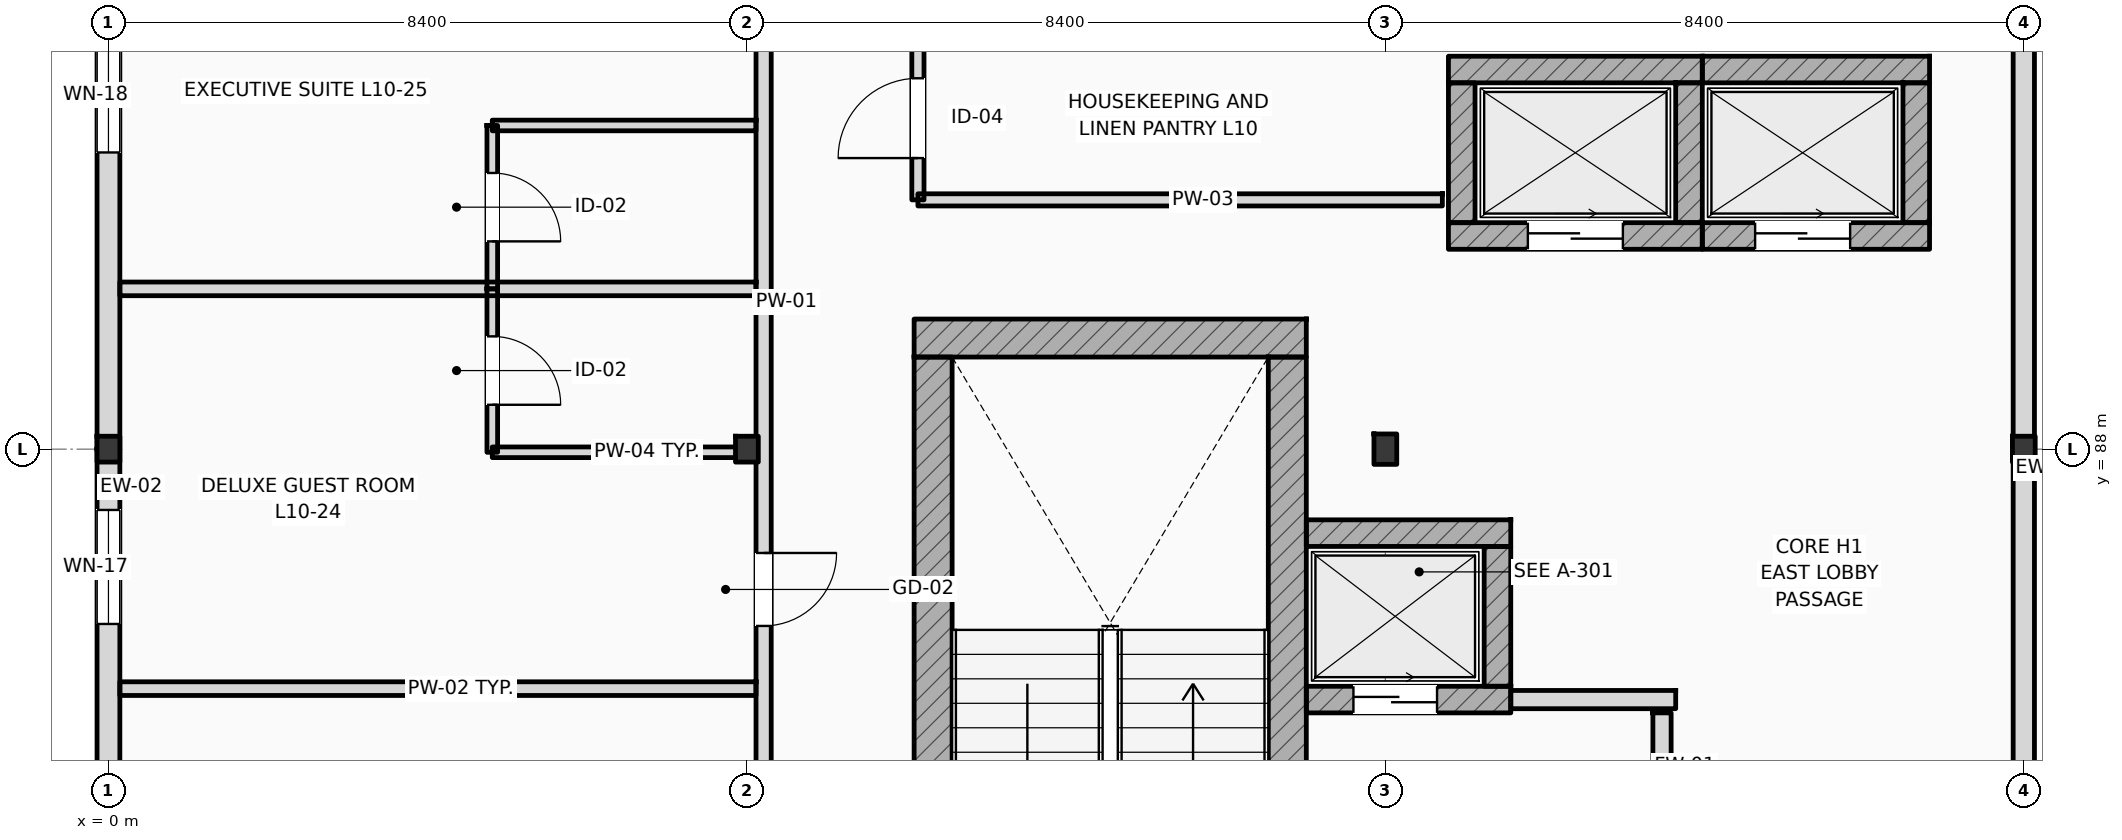
"""IFC4 building model, lengths in metres.
Left out: names, types, materials, properties, quantities, classifications, styles, units other than length and angle.
Written with IfcOpenShell. Run it as: python <this file> out.ifc"""

import sys

from ifc_helpers import new_model, si_unit, direction, frame, frame_2d, origin, origin_2d, place, context, subcontext, project, spatial, rectangle, i_section, extrude, element, fill, save


model = new_model("IFC4")
c1 = context("Model", 3, precision=1e-05, world=origin(), true_north=direction((0.0, 1.0)))
c2 = subcontext(c1, "Body", "Model", "MODEL_VIEW")
j1 = project(units=[si_unit("LENGTHUNIT", "METRE"), si_unit("PLANEANGLEUNIT", "RADIAN")], contexts=[c1])
p1 = place(None, origin())
s1 = spatial("IfcSite", under=j1, at=p1, CompositionType="ELEMENT")
p2 = place(p1, origin())
s2 = spatial("IfcBuilding", under=s1, at=p2, CompositionType="ELEMENT")
p3 = place(p2, frame((0.0, 0.0, 42.6)))
s3 = spatial("IfcBuildingStorey", under=s2, at=p3, CompositionType="ELEMENT", Elevation=42.6)
for number, where, z_axis, x_axis in (
    (1, (0.0, 88.0, 0.0), (0.0, 0.0, 1.0), (1.0, 0.0, 0.0)),
    (2, (8.4, 88.0, 0.0), (0.0, 0.0, 1.0), (1.0, 0.0, 0.0)),
):
    element("IfcColumn", number, at=place(p3, frame(where, z_axis=z_axis, x_axis=x_axis)), inside=s3, PredefinedType="COLUMN", context=c2, shape_type="SweptSolid", body=[
        extrude(i_section(OverallWidth=0.3, OverallDepth=0.34, WebThickness=0.012, FlangeThickness=0.021, FilletRadius=0.027, at=origin_2d()), origin(), (0.0, 0.0, 1.0), 4.2),
    ])
p4 = place(p3, frame((16.8, 88.0, 0.0), z_axis=(0.0, 0.0, 1.0), x_axis=(1.0, 0.0, 0.0)))
e3 = element("IfcColumn", 3, at=p4, inside=s3, PredefinedType="COLUMN", context=c2, shape_type="SweptSolid", body=[
    extrude(i_section(OverallWidth=0.3, OverallDepth=0.4, WebThickness=0.013, FlangeThickness=0.024, FilletRadius=0.027, at=origin_2d()), origin(), (0.0, 0.0, 1.0), 4.2),
])
p5 = place(p3, frame((25.2, 88.0, 0.0), z_axis=(0.0, 0.0, 1.0), x_axis=(1.0, 0.0, 0.0)))
e4 = element("IfcColumn", 4, at=p5, inside=s3, PredefinedType="COLUMN", context=c2, shape_type="SweptSolid", body=[
    extrude(i_section(OverallWidth=0.3, OverallDepth=0.34, WebThickness=0.012, FlangeThickness=0.021, FilletRadius=0.027, at=origin_2d()), origin(), (0.0, 0.0, 1.0), 4.2),
])
p6 = place(p3, frame((10.6, 89.462, 0.0), z_axis=(0.0, 0.0, 1.0), x_axis=(1.0, 0.0, 0.0)))
e5 = element("IfcWall", 5, at=p6, inside=s3, PredefinedType="SHEAR", context=c2, shape_type="SweptSolid", body=[
    extrude(rectangle(XDim=5.16, YDim=0.5, at=frame_2d((2.58, 0.0))), origin(), (0.0, 0.0, 1.0), 4.2),
])
p7 = place(p3, frame((10.85, 80.1, 0.0), z_axis=(0.0, 0.0, 1.0), x_axis=(0.0, 1.0, 0.0)))
e6 = element("IfcWall", 6, at=p7, inside=s3, PredefinedType="SHEAR", context=c2, shape_type="SweptSolid", body=[
    extrude(rectangle(XDim=9.112, YDim=0.5, at=frame_2d((4.556, 0.0))), origin(), (0.0, 0.0, 1.0), 4.2),
])
p8 = place(p3, frame((15.51, 80.1, 0.0), z_axis=(0.0, 0.0, 1.0), x_axis=(0.0, 1.0, 0.0)))
e7 = element("IfcWall", 7, at=p8, inside=s3, PredefinedType="SHEAR", context=c2, shape_type="SweptSolid", body=[
    extrude(rectangle(XDim=9.112, YDim=0.5, at=frame_2d((4.556, 0.0))), origin(), (0.0, 0.0, 1.0), 4.2),
])
p9 = place(p8, frame((0.44, 0.0, 0.0)))
e8 = element("IfcOpeningElement", 8, at=p9, cuts=e7, PredefinedType="OPENING", context=c2, shape_type="SweptSolid", body=[
    extrude(rectangle(XDim=1.1, YDim=2.2, at=frame_2d((0.55, 1.1))), frame((0.0, 0.26, 0.0), z_axis=(0.0, -1.0, 0.0), x_axis=(1.0, 0.0, 0.0)), (0.0, 0.0, 1.0), 0.52),
])
p10 = place(p3, frame((0.0, 79.5, 0.0), z_axis=(0.0, 0.0, 1.0), x_axis=(0.0, 1.0, 0.0)))
e9 = element("IfcWall", 9, at=p10, inside=s3, PredefinedType="STANDARD", context=c2, shape_type="SweptSolid", body=[
    extrude(rectangle(XDim=8.5, YDim=0.3, at=frame_2d((4.25, 0.0))), origin(), (0.0, 0.0, 1.0), 3.57),
])
p11 = place(p10, frame((2.075, 0.0, 0.9)))
e10 = element("IfcOpeningElement", 10, at=p11, cuts=e9, PredefinedType="OPENING", context=c2, shape_type="SweptSolid", body=[
    extrude(rectangle(XDim=1.5, YDim=2.49, at=frame_2d((0.75, 1.245))), frame((0.0, 0.16, 0.0), z_axis=(0.0, -1.0, 0.0), x_axis=(1.0, 0.0, 0.0)), (0.0, 0.0, 1.0), 0.32),
])
p12 = place(p10, frame((6.2, 0.0, 0.9)))
e11 = element("IfcOpeningElement", 11, at=p12, cuts=e9, PredefinedType="OPENING", context=c2, shape_type="SweptSolid", body=[
    extrude(rectangle(XDim=1.5, YDim=2.49, at=frame_2d((0.75, 1.245))), frame((0.0, 0.16, 0.0), z_axis=(0.0, -1.0, 0.0), x_axis=(1.0, 0.0, 0.0)), (0.0, 0.0, 1.0), 0.32),
])
p13 = place(p3, frame((0.0, 88.0, 0.0), z_axis=(0.0, 0.0, 1.0), x_axis=(0.0, 1.0, 0.0)))
e12 = element("IfcWall", 12, at=p13, inside=s3, PredefinedType="STANDARD", context=c2, shape_type="SweptSolid", body=[
    extrude(rectangle(XDim=7.5, YDim=0.3, at=frame_2d((3.75, 0.0))), origin(), (0.0, 0.0, 1.0), 3.94),
])
p14 = place(p13, frame((3.904, 0.0, 0.9)))
e13 = element("IfcOpeningElement", 13, at=p14, cuts=e12, PredefinedType="OPENING", context=c2, shape_type="SweptSolid", body=[
    extrude(rectangle(XDim=1.5, YDim=2.86, at=frame_2d((0.75, 1.43))), frame((0.0, 0.16, 0.0), z_axis=(0.0, -1.0, 0.0), x_axis=(1.0, 0.0, 0.0)), (0.0, 0.0, 1.0), 0.32),
])
p15 = place(p3, frame((25.2, 79.5, 0.0), z_axis=(0.0, 0.0, 1.0), x_axis=(0.0, 1.0, 0.0)))
e14 = element("IfcWall", 14, at=p15, inside=s3, PredefinedType="STANDARD", context=c2, shape_type="SweptSolid", body=[
    extrude(rectangle(XDim=16.5, YDim=0.28, at=frame_2d((8.25, 0.0))), origin(), (0.0, 0.0, 1.0), 3.57),
])
p16 = place(p3, frame((15.76, 86.895, 0.0), z_axis=(0.0, 0.0, 1.0), x_axis=(1.0, 0.0, 0.0)))
e15 = element("IfcWall", 15, at=p16, inside=s3, PredefinedType="SHEAR", context=c2, shape_type="SweptSolid", body=[
    extrude(rectangle(XDim=2.69, YDim=0.35, at=frame_2d((1.345, 0.0))), origin(), (0.0, 0.0, 1.0), 3.94),
])
p17 = place(p3, frame((15.76, 84.705, 0.0), z_axis=(0.0, 0.0, 1.0), x_axis=(1.0, 0.0, 0.0)))
e16 = element("IfcWall", 16, at=p17, inside=s3, PredefinedType="SHEAR", context=c2, shape_type="SweptSolid", body=[
    extrude(rectangle(XDim=2.69, YDim=0.35, at=frame_2d((1.345, 0.0))), origin(), (0.0, 0.0, 1.0), 3.94),
])
p18 = place(p17, frame((0.62, 0.0, 0.0)))
e17 = element("IfcOpeningElement", 17, at=p18, cuts=e16, PredefinedType="OPENING", context=c2, shape_type="SweptSolid", body=[
    extrude(rectangle(XDim=1.1, YDim=2.2, at=frame_2d((0.55, 1.1))), frame((0.0, 0.185, 0.0), z_axis=(0.0, -1.0, 0.0), x_axis=(1.0, 0.0, 0.0)), (0.0, 0.0, 1.0), 0.37),
])
p19 = place(p3, frame((18.275, 84.88, 0.0), z_axis=(0.0, 0.0, 1.0), x_axis=(0.0, 1.0, 0.0)))
e18 = element("IfcWall", 18, at=p19, inside=s3, PredefinedType="SHEAR", context=c2, shape_type="SweptSolid", body=[
    extrude(rectangle(XDim=1.84, YDim=0.35, at=frame_2d((0.92, 0.0))), origin(), (0.0, 0.0, 1.0), 3.94),
])
p20 = place(p3, frame((17.63, 92.995, 0.0), z_axis=(0.0, 0.0, 1.0), x_axis=(1.0, 0.0, 0.0)))
e19 = element("IfcWall", 19, at=p20, inside=s3, PredefinedType="SHEAR", context=c2, shape_type="SweptSolid", body=[
    extrude(rectangle(XDim=3.34, YDim=0.35, at=frame_2d((1.67, 0.0))), origin(), (0.0, 0.0, 1.0), 3.94),
])
p21 = place(p3, frame((17.63, 90.805, 0.0), z_axis=(0.0, 0.0, 1.0), x_axis=(1.0, 0.0, 0.0)))
e20 = element("IfcWall", 20, at=p21, inside=s3, PredefinedType="SHEAR", context=c2, shape_type="SweptSolid", body=[
    extrude(rectangle(XDim=3.34, YDim=0.35, at=frame_2d((1.67, 0.0))), origin(), (0.0, 0.0, 1.0), 3.94),
])
p22 = place(p21, frame((1.045, 0.0, 0.0)))
e21 = element("IfcOpeningElement", 21, at=p22, cuts=e20, PredefinedType="OPENING", context=c2, shape_type="SweptSolid", body=[
    extrude(rectangle(XDim=1.25, YDim=2.25, at=frame_2d((0.625, 1.125))), frame((0.0, 0.185, 0.0), z_axis=(0.0, -1.0, 0.0), x_axis=(1.0, 0.0, 0.0)), (0.0, 0.0, 1.0), 0.37),
])
for number, where, z_axis, x_axis in (
    (22, (17.805, 90.98, 0.0), (0.0, 0.0, 1.0), (0.0, 1.0, 0.0)),
    (23, (20.795, 90.98, 0.0), (0.0, 0.0, 1.0), (0.0, 1.0, 0.0)),
):
    element("IfcWall", number, at=place(p3, frame(where, z_axis=z_axis, x_axis=x_axis)), inside=s3, PredefinedType="SHEAR", context=c2, shape_type="SweptSolid", body=[
        extrude(rectangle(XDim=1.84, YDim=0.35, at=frame_2d((0.92, 0.0))), origin(), (0.0, 0.0, 1.0), 3.94),
    ])
p23 = place(p3, frame((20.97, 92.995, 0.0), z_axis=(0.0, 0.0, 1.0), x_axis=(1.0, 0.0, 0.0)))
e24 = element("IfcWall", 24, at=p23, inside=s3, PredefinedType="SHEAR", context=c2, shape_type="SweptSolid", body=[
    extrude(rectangle(XDim=2.99, YDim=0.35, at=frame_2d((1.495, 0.0))), origin(), (0.0, 0.0, 1.0), 3.94),
])
p24 = place(p3, frame((20.97, 90.805, 0.0), z_axis=(0.0, 0.0, 1.0), x_axis=(1.0, 0.0, 0.0)))
e25 = element("IfcWall", 25, at=p24, inside=s3, PredefinedType="SHEAR", context=c2, shape_type="SweptSolid", body=[
    extrude(rectangle(XDim=2.99, YDim=0.35, at=frame_2d((1.495, 0.0))), origin(), (0.0, 0.0, 1.0), 3.94),
])
p25 = place(p24, frame((0.695, 0.0, 0.0)))
e26 = element("IfcOpeningElement", 26, at=p25, cuts=e25, PredefinedType="OPENING", context=c2, shape_type="SweptSolid", body=[
    extrude(rectangle(XDim=1.25, YDim=2.25, at=frame_2d((0.625, 1.125))), frame((0.0, 0.185, 0.0), z_axis=(0.0, -1.0, 0.0), x_axis=(1.0, 0.0, 0.0)), (0.0, 0.0, 1.0), 0.37),
])
p26 = place(p3, frame((23.785, 90.98, 0.0), z_axis=(0.0, 0.0, 1.0), x_axis=(0.0, 1.0, 0.0)))
e27 = element("IfcWall", 27, at=p26, inside=s3, PredefinedType="SHEAR", context=c2, shape_type="SweptSolid", body=[
    extrude(rectangle(XDim=1.84, YDim=0.35, at=frame_2d((0.92, 0.0))), origin(), (0.0, 0.0, 1.0), 3.94),
])
p27 = place(p3, frame((18.45, 84.705, 0.0), z_axis=(0.0, 0.0, 1.0), x_axis=(1.0, 0.0, 0.0)))
e28 = element("IfcWall", 28, at=p27, inside=s3, PredefinedType="STANDARD", context=c2, shape_type="SweptSolid", body=[
    extrude(rectangle(XDim=2.17, YDim=0.24, at=frame_2d((1.085, 0.0))), origin(), (0.0, 0.0, 1.0), 3.94),
])
p28 = place(p3, frame((20.44, 80.08, 0.0), z_axis=(0.0, 0.0, 1.0), x_axis=(0.0, 1.0, 0.0)))
e29 = element("IfcWall", 29, at=p28, inside=s3, PredefinedType="STANDARD", context=c2, shape_type="SweptSolid", body=[
    extrude(rectangle(XDim=4.45, YDim=0.24, at=frame_2d((2.225, 0.0))), origin(), (0.0, 0.0, 1.0), 3.94),
])
p29 = place(p28, frame((1.65, 0.0, 0.0)))
e30 = element("IfcOpeningElement", 30, at=p29, cuts=e29, PredefinedType="OPENING", context=c2, shape_type="SweptSolid", body=[
    extrude(rectangle(XDim=1.1, YDim=2.2, at=frame_2d((0.55, 1.1))), frame((0.0, 0.13, 0.0), z_axis=(0.0, -1.0, 0.0), x_axis=(1.0, 0.0, 0.0)), (0.0, 0.0, 1.0), 0.26),
])
p30 = place(p3, frame((8.62, 79.64, 0.0), z_axis=(0.0, 0.0, 1.0), x_axis=(0.0, 1.0, 0.0)))
e31 = element("IfcWall", 31, at=p30, inside=s3, PredefinedType="PARTITIONING", context=c2, shape_type="SweptSolid", body=[
    extrude(rectangle(XDim=15.66, YDim=0.2, at=frame_2d((7.83, 0.0))), origin(), (0.0, 0.0, 1.0), 3.57),
])
p31 = place(p30, frame((3.28, 0.0, 0.0)))
e32 = element("IfcOpeningElement", 32, at=p31, cuts=e31, PredefinedType="OPENING", context=c2, shape_type="SweptSolid", body=[
    extrude(rectangle(XDim=0.96, YDim=2.2, at=frame_2d((0.48, 1.1))), frame((0.0, 0.11, 0.0), z_axis=(0.0, -1.0, 0.0), x_axis=(1.0, 0.0, 0.0)), (0.0, 0.0, 1.0), 0.22),
])
p32 = place(p30, frame((6.034, 0.0, 0.0)))
e33 = element("IfcOpeningElement", 33, at=p32, cuts=e31, PredefinedType="OPENING", context=c2, shape_type="SweptSolid", body=[
    extrude(rectangle(XDim=0.96, YDim=2.2, at=frame_2d((0.48, 1.1))), frame((0.0, 0.11, 0.0), z_axis=(0.0, -1.0, 0.0), x_axis=(1.0, 0.0, 0.0)), (0.0, 0.0, 1.0), 0.22),
])
p33 = place(p30, frame((13.61, 0.0, 0.0)))
e34 = element("IfcOpeningElement", 34, at=p33, cuts=e31, PredefinedType="OPENING", context=c2, shape_type="SweptSolid", body=[
    extrude(rectangle(XDim=0.96, YDim=2.2, at=frame_2d((0.48, 1.1))), frame((0.0, 0.11, 0.0), z_axis=(0.0, -1.0, 0.0), x_axis=(1.0, 0.0, 0.0)), (0.0, 0.0, 1.0), 0.22),
])
p34 = place(p3, frame((10.65, 91.28, 0.0), z_axis=(0.0, 0.0, 1.0), x_axis=(0.0, 1.0, 0.0)))
e35 = element("IfcWall", 35, at=p34, inside=s3, PredefinedType="PARTITIONING", context=c2, shape_type="SweptSolid", body=[
    extrude(rectangle(XDim=4.58, YDim=0.16, at=frame_2d((2.29, 0.0))), origin(), (0.0, 0.0, 1.0), 3.94),
])
p35 = place(p34, frame((0.55, 0.0, 0.0)))
e36 = element("IfcOpeningElement", 36, at=p35, cuts=e35, PredefinedType="OPENING", context=c2, shape_type="SweptSolid", body=[
    extrude(rectangle(XDim=1.05, YDim=2.12, at=frame_2d((0.525, 1.06))), frame((0.0, 0.09, 0.0), z_axis=(0.0, -1.0, 0.0), x_axis=(1.0, 0.0, 0.0)), (0.0, 0.0, 1.0), 0.18),
])
p36 = place(p34, frame((2.75, 0.0, 0.0)))
e37 = element("IfcOpeningElement", 37, at=p36, cuts=e35, PredefinedType="OPENING", context=c2, shape_type="SweptSolid", body=[
    extrude(rectangle(XDim=0.94, YDim=2.15, at=frame_2d((0.47, 1.075))), frame((0.0, 0.09, 0.0), z_axis=(0.0, -1.0, 0.0), x_axis=(1.0, 0.0, 0.0)), (0.0, 0.0, 1.0), 0.18),
])
for number, where, z_axis, x_axis in (
    (38, (0.15, 84.849, 0.0), (0.0, 0.0, 1.0), (1.0, 0.0, 0.0)),
    (39, (0.15, 90.109, 0.0), (0.0, 0.0, 1.0), (1.0, 0.0, 0.0)),
):
    element("IfcWall", number, at=place(p3, frame(where, z_axis=z_axis, x_axis=x_axis)), inside=s3, PredefinedType="PARTITIONING", context=c2, shape_type="SweptSolid", body=[
        extrude(rectangle(XDim=8.37, YDim=0.18, at=frame_2d((4.185, 0.0))), origin(), (0.0, 0.0, 1.0), 3.94),
    ])
p37 = place(p3, frame((5.05, 87.959, 0.0), z_axis=(0.0, 0.0, 1.0), x_axis=(1.0, 0.0, 0.0)))
e40 = element("IfcWall", 40, at=p37, inside=s3, PredefinedType="PARTITIONING", context=c2, shape_type="SweptSolid", body=[
    extrude(rectangle(XDim=3.47, YDim=0.14, at=frame_2d((1.735, 0.0))), origin(), (0.0, 0.0, 1.0), 3.38),
])
p38 = place(p3, frame((5.05, 87.959, 0.0), z_axis=(0.0, 0.0, 1.0), x_axis=(0.0, 1.0, 0.0)))
e41 = element("IfcWall", 41, at=p38, inside=s3, PredefinedType="PARTITIONING", context=c2, shape_type="SweptSolid", body=[
    extrude(rectangle(XDim=2.15, YDim=0.14, at=frame_2d((1.075, 0.0))), origin(), (0.0, 0.0, 1.0), 3.94),
])
p39 = place(p38, frame((0.625, 0.0, 0.0)))
e42 = element("IfcOpeningElement", 42, at=p39, cuts=e41, PredefinedType="OPENING", context=c2, shape_type="SweptSolid", body=[
    extrude(rectangle(XDim=0.9, YDim=2.1, at=frame_2d((0.45, 1.05))), frame((0.0, 0.08, 0.0), z_axis=(0.0, -1.0, 0.0), x_axis=(1.0, 0.0, 0.0)), (0.0, 0.0, 1.0), 0.16),
])
p40 = place(p3, frame((5.05, 92.259, 0.0), z_axis=(0.0, 0.0, 1.0), x_axis=(1.0, 0.0, 0.0)))
e43 = element("IfcWall", 43, at=p40, inside=s3, PredefinedType="PARTITIONING", context=c2, shape_type="SweptSolid", body=[
    extrude(rectangle(XDim=3.47, YDim=0.14, at=frame_2d((1.735, 0.0))), origin(), (0.0, 0.0, 1.0), 3.94),
])
p41 = place(p3, frame((5.05, 90.109, 0.0), z_axis=(0.0, 0.0, 1.0), x_axis=(0.0, 1.0, 0.0)))
e44 = element("IfcWall", 44, at=p41, inside=s3, PredefinedType="PARTITIONING", context=c2, shape_type="SweptSolid", body=[
    extrude(rectangle(XDim=2.15, YDim=0.14, at=frame_2d((1.075, 0.0))), origin(), (0.0, 0.0, 1.0), 3.94),
])
p42 = place(p41, frame((0.625, 0.0, 0.0)))
e45 = element("IfcOpeningElement", 45, at=p42, cuts=e44, PredefinedType="OPENING", context=c2, shape_type="SweptSolid", body=[
    extrude(rectangle(XDim=0.9, YDim=2.1, at=frame_2d((0.45, 1.05))), frame((0.0, 0.08, 0.0), z_axis=(0.0, -1.0, 0.0), x_axis=(1.0, 0.0, 0.0)), (0.0, 0.0, 1.0), 0.16),
])
p43 = place(p3, frame((10.65, 91.28, 0.0), z_axis=(0.0, 0.0, 1.0), x_axis=(1.0, 0.0, 0.0)))
e46 = element("IfcWall", 46, at=p43, inside=s3, PredefinedType="PARTITIONING", context=c2, shape_type="SweptSolid", body=[
    extrude(rectangle(XDim=6.9, YDim=0.16, at=frame_2d((3.45, 0.0))), origin(), (0.0, 0.0, 1.0), 3.94),
])
p44 = place(p12, origin())
e47 = element("IfcWindow", 47, at=p44, inside=s3, PartitioningType="DOUBLE_PANEL_VERTICAL", PredefinedType="WINDOW", context=c2, shape_type="SweptSolid", body=[
    extrude(rectangle(XDim=1.5, YDim=2.49, at=frame_2d((0.75, 1.245))), frame((0.0, 0.03, 0.0), z_axis=(0.0, -1.0, 0.0), x_axis=(1.0, 0.0, 0.0)), (0.0, 0.0, 1.0), 0.06),
])
fill(e11, e47)
p45 = place(p14, origin())
e48 = element("IfcWindow", 48, at=p45, inside=s3, PartitioningType="DOUBLE_PANEL_VERTICAL", PredefinedType="WINDOW", context=c2, shape_type="SweptSolid", body=[
    extrude(rectangle(XDim=1.5, YDim=2.86, at=frame_2d((0.75, 1.43))), frame((0.0, 0.03, 0.0), z_axis=(0.0, -1.0, 0.0), x_axis=(1.0, 0.0, 0.0)), (0.0, 0.0, 1.0), 0.06),
])
fill(e13, e48)
p46 = place(p18, origin())
e49 = element("IfcDoor", 49, at=p46, inside=s3, OperationType="SLIDING_TO_LEFT", PredefinedType="DOOR", context=c2, shape_type="SweptSolid", body=[
    extrude(rectangle(XDim=1.1, YDim=2.2, at=frame_2d((0.55, 1.1))), frame((0.0, 0.025, 0.0), z_axis=(0.0, -1.0, 0.0), x_axis=(1.0, 0.0, 0.0)), (0.0, 0.0, 1.0), 0.05),
])
fill(e17, e49)
p47 = place(p22, origin())
e50 = element("IfcDoor", 50, at=p47, inside=s3, OperationType="SLIDING_TO_LEFT", PredefinedType="DOOR", context=c2, shape_type="SweptSolid", body=[
    extrude(rectangle(XDim=1.25, YDim=2.25, at=frame_2d((0.625, 1.125))), frame((0.0, 0.025, 0.0), z_axis=(0.0, -1.0, 0.0), x_axis=(1.0, 0.0, 0.0)), (0.0, 0.0, 1.0), 0.05),
])
fill(e21, e50)
p48 = place(p25, origin())
e51 = element("IfcDoor", 51, at=p48, inside=s3, OperationType="SLIDING_TO_LEFT", PredefinedType="DOOR", context=c2, shape_type="SweptSolid", body=[
    extrude(rectangle(XDim=1.25, YDim=2.25, at=frame_2d((0.625, 1.125))), frame((0.0, 0.025, 0.0), z_axis=(0.0, -1.0, 0.0), x_axis=(1.0, 0.0, 0.0)), (0.0, 0.0, 1.0), 0.05),
])
fill(e26, e51)
p49 = place(p32, frame((0.96, 0.0, 0.0), z_axis=(0.0, 0.0, 1.0), x_axis=(-1.0, 0.0, 0.0)))
e52 = element("IfcDoor", 52, at=p49, inside=s3, OperationType="SINGLE_SWING_RIGHT", PredefinedType="DOOR", context=c2, shape_type="SweptSolid", body=[
    extrude(rectangle(XDim=0.96, YDim=2.2, at=frame_2d((0.48, 1.1))), frame((0.0, 0.025, 0.0), z_axis=(0.0, -1.0, 0.0), x_axis=(1.0, 0.0, 0.0)), (0.0, 0.0, 1.0), 0.05),
])
fill(e33, e52)
p50 = place(p39, frame((0.9, 0.0, 0.0), z_axis=(0.0, 0.0, 1.0), x_axis=(-1.0, 0.0, 0.0)))
e53 = element("IfcDoor", 53, at=p50, inside=s3, OperationType="SINGLE_SWING_LEFT", PredefinedType="DOOR", context=c2, shape_type="SweptSolid", body=[
    extrude(rectangle(XDim=0.9, YDim=2.1, at=frame_2d((0.45, 1.05))), frame((0.0, 0.025, 0.0), z_axis=(0.0, -1.0, 0.0), x_axis=(1.0, 0.0, 0.0)), (0.0, 0.0, 1.0), 0.05),
])
fill(e42, e53)
p51 = place(p42, frame((0.9, 0.0, 0.0), z_axis=(0.0, 0.0, 1.0), x_axis=(-1.0, 0.0, 0.0)))
e54 = element("IfcDoor", 54, at=p51, inside=s3, OperationType="SINGLE_SWING_LEFT", PredefinedType="DOOR", context=c2, shape_type="SweptSolid", body=[
    extrude(rectangle(XDim=0.9, YDim=2.1, at=frame_2d((0.45, 1.05))), frame((0.0, 0.025, 0.0), z_axis=(0.0, -1.0, 0.0), x_axis=(1.0, 0.0, 0.0)), (0.0, 0.0, 1.0), 0.05),
])
fill(e45, e54)
p52 = place(p35, origin())
e55 = element("IfcDoor", 55, at=p52, inside=s3, OperationType="SINGLE_SWING_LEFT", PredefinedType="DOOR", context=c2, shape_type="SweptSolid", body=[
    extrude(rectangle(XDim=1.05, YDim=2.12, at=frame_2d((0.525, 1.06))), frame((0.0, 0.025, 0.0), z_axis=(0.0, -1.0, 0.0), x_axis=(1.0, 0.0, 0.0)), (0.0, 0.0, 1.0), 0.05),
])
fill(e36, e55)
save(model, sys.argv[1])
